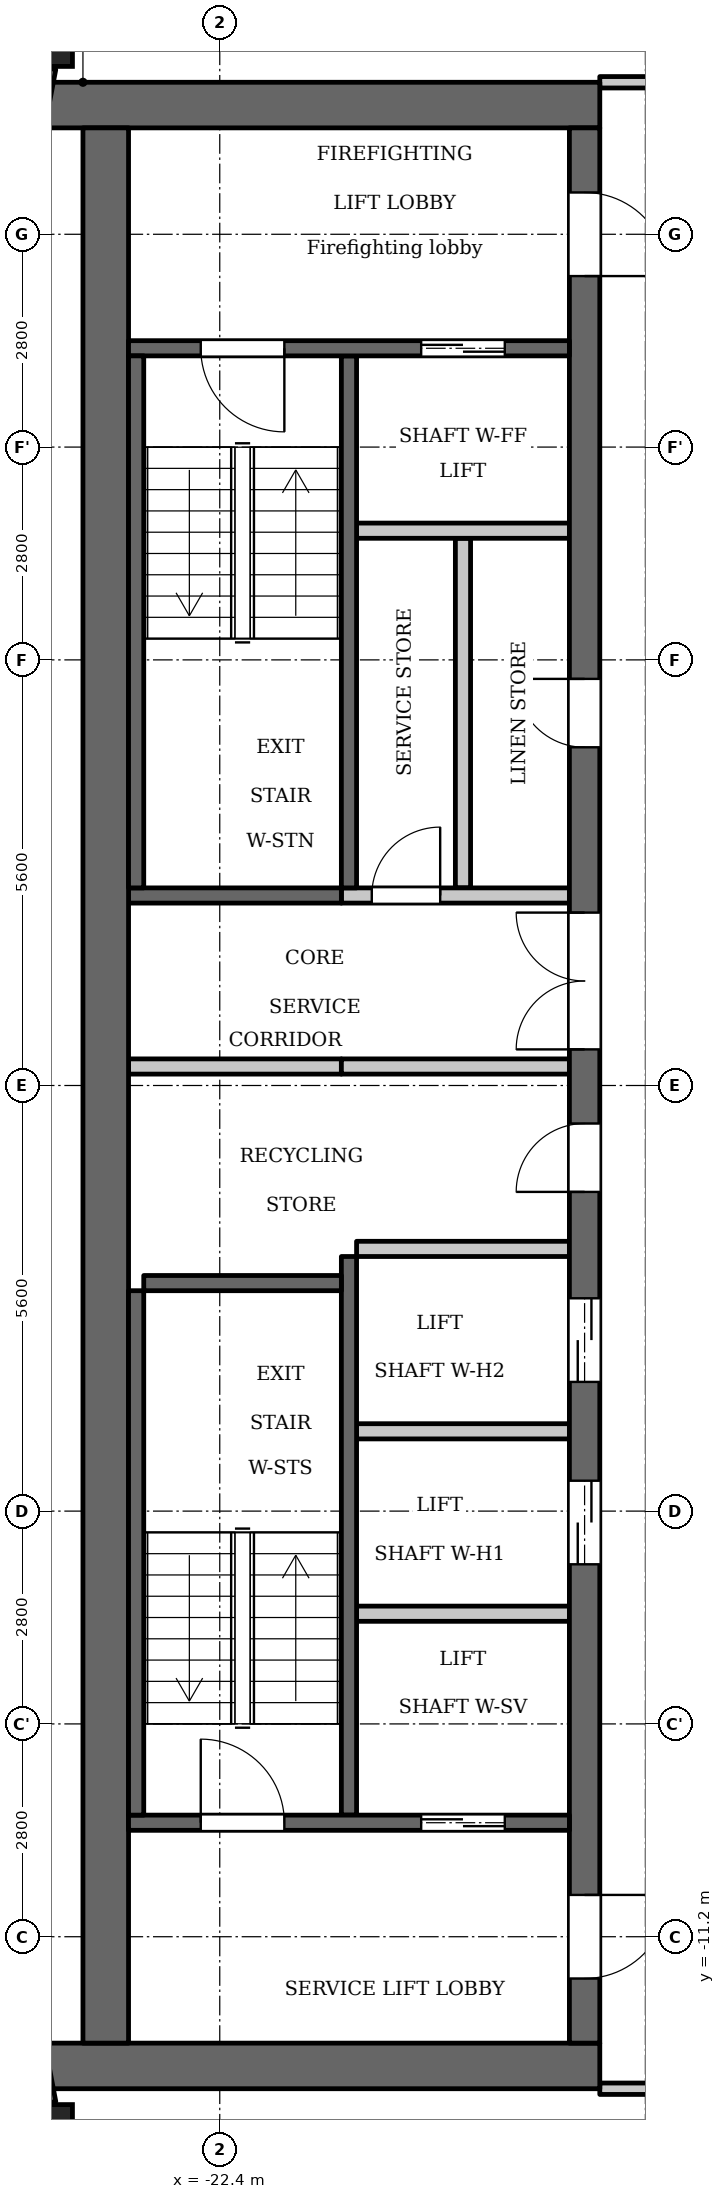
"""IFC4 building model, lengths in metres.
Left out: names, types, materials, properties, quantities, classifications, styles, units other than length and angle.
Written with IfcOpenShell. Run it as: python <this file> out.ifc"""

import sys

from ifc_helpers import new_model, si_unit, direction, frame, frame_2d, origin, origin_2d, place, context, subcontext, project, spatial, rectangle, extrude, element, fill, save


model = new_model("IFC4")
c1 = context("Model", 3, precision=1e-05, world=origin(), true_north=direction((0.0, 1.0)))
c2 = subcontext(c1, "Body", "Model", "MODEL_VIEW")
j1 = project(units=[si_unit("LENGTHUNIT", "METRE"), si_unit("PLANEANGLEUNIT", "RADIAN")], contexts=[c1])
p1 = place(None, origin())
s1 = spatial("IfcSite", under=j1, at=p1, CompositionType="ELEMENT")
p2 = place(p1, origin())
s2 = spatial("IfcBuilding", under=s1, at=p2, CompositionType="ELEMENT")
p3 = place(p2, frame((0.0, 0.0, 262.7)))
s3 = spatial("IfcBuildingStorey", under=s2, at=p3, CompositionType="ELEMENT", Elevation=262.7)
for number, where, z_axis, x_axis in (
    (1, (-24.738, 13.809, 0.0), (0.0, 0.0, 1.0), (1.0, 0.0, 0.0)),
    (2, (-24.738, -13.809, 0.0), (0.0, 0.0, 1.0), (1.0, 0.0, 0.0)),
):
    element("IfcColumn", number, at=place(p3, frame(where, z_axis=z_axis, x_axis=x_axis)), inside=s3, PredefinedType="COLUMN", context=c2, shape_type="SweptSolid", body=[
        extrude(rectangle(XDim=0.8, YDim=0.8, at=origin_2d()), origin(), (0.0, 0.0, 1.0), 3.5),
    ])
for number, where, z_axis, x_axis in (
    (3, (-24.705, 13.395, 0.0), (0.0, 0.0, 1.0), (-0.187, -0.982, 0.0)),
    (4, (-25.053, -11.572, 0.0), (0.0, 0.0, 1.0), (0.187, -0.982, 0.0)),
):
    element("IfcWall", number, at=place(p3, frame(where, z_axis=z_axis, x_axis=x_axis)), inside=s3, PredefinedType="SOLIDWALL", context=c2, shape_type="SweptSolid", body=[
        extrude(rectangle(XDim=1.856, YDim=0.3, at=frame_2d((0.928, 0.0))), origin(), (0.0, 0.0, 1.0), 2.55),
    ])
p4 = place(p3, frame((-20.7, 2.6, 0.0), z_axis=(0.0, 0.0, 1.0), x_axis=(0.0, 1.0, 0.0)))
e5 = element("IfcWall", 5, at=p4, inside=s3, PredefinedType="SHEAR", context=c2, shape_type="SweptSolid", body=[
    extrude(rectangle(XDim=7.0, YDim=0.2, at=frame_2d((3.5, 0.0))), origin(), (0.0, 0.0, 1.0), 3.2),
])
p5 = place(p3, frame((-20.7, -9.6, 0.0), z_axis=(0.0, 0.0, 1.0), x_axis=(0.0, 1.0, 0.0)))
e6 = element("IfcWall", 6, at=p5, inside=s3, PredefinedType="SHEAR", context=c2, shape_type="SweptSolid", body=[
    extrude(rectangle(XDim=7.35, YDim=0.2, at=frame_2d((3.675, 0.0))), origin(), (0.0, 0.0, 1.0), 3.2),
])
p6 = place(p3, frame((-20.8, 2.5, 0.0), z_axis=(0.0, 0.0, 1.0), x_axis=(-1.0, 0.0, 0.0)))
e7 = element("IfcWall", 7, at=p6, inside=s3, PredefinedType="SHEAR", context=c2, shape_type="SweptSolid", body=[
    extrude(rectangle(XDim=2.8, YDim=0.2, at=frame_2d((1.4, 0.0))), origin(), (0.0, 0.0, 1.0), 3.2),
])
p7 = place(p3, frame((-20.8, 0.25, 0.0), z_axis=(0.0, 0.0, 1.0), x_axis=(-1.0, 0.0, 0.0)))
e8 = element("IfcWall", 8, at=p7, inside=s3, PredefinedType="PARTITIONING", context=c2, shape_type="SweptSolid", body=[
    extrude(rectangle(XDim=2.8, YDim=0.2, at=frame_2d((1.4, 0.0))), origin(), (0.0, 0.0, 1.0), 3.2),
])
for number, where, z_axis, x_axis in (
    (9, (-17.4, 12.9, 0.0), (0.0, 0.0, 1.0), (-1.0, 0.0, 0.0)),
    (10, (-17.4, -12.9, 0.0), (0.0, 0.0, 1.0), (-1.0, 0.0, 0.0)),
):
    element("IfcWall", number, at=place(p3, frame(where, z_axis=z_axis, x_axis=x_axis)), inside=s3, PredefinedType="SHEAR", context=c2, shape_type="SweptSolid", body=[
        extrude(rectangle(XDim=7.32, YDim=0.6, at=frame_2d((3.66, 0.0))), origin(), (0.0, 0.0, 1.0), 3.2),
    ])
p8 = place(p3, frame((-19.2, 2.6, 0.0), z_axis=(0.0, 0.0, 1.0), x_axis=(0.0, 1.0, 0.0)))
e11 = element("IfcWall", 11, at=p8, inside=s3, PredefinedType="PARTITIONING", context=c2, shape_type="SweptSolid", body=[
    extrude(rectangle(XDim=4.6, YDim=0.2, at=frame_2d((2.3, 0.0))), origin(), (0.0, 0.0, 1.0), 3.2),
])
p9 = place(p3, frame((-17.6, -12.6, 0.0), z_axis=(0.0, 0.0, 1.0), x_axis=(0.0, 1.0, 0.0)))
e12 = element("IfcWall", 12, at=p9, inside=s3, PredefinedType="SHEAR", context=c2, shape_type="SweptSolid", body=[
    extrude(rectangle(XDim=25.2, YDim=0.4, at=frame_2d((12.6, 0.0))), origin(), (0.0, 0.0, 1.0), 3.2),
])
p10 = place(p9, frame((6.3, 0.0, 0.0)))
e13 = element("IfcOpeningElement", 13, at=p10, cuts=e12, PredefinedType="OPENING", context=c2, shape_type="SweptSolid", body=[
    extrude(rectangle(XDim=1.1, YDim=2.1, at=frame_2d((0.55, 1.05))), frame((0.0, 0.21, 0.0), z_axis=(0.0, -1.0, 0.0), x_axis=(1.0, 0.0, 0.0)), (0.0, 0.0, 1.0), 0.42),
])
p11 = place(p9, frame((8.7, 0.0, 0.0)))
e14 = element("IfcOpeningElement", 14, at=p11, cuts=e12, PredefinedType="OPENING", context=c2, shape_type="SweptSolid", body=[
    extrude(rectangle(XDim=1.1, YDim=2.1, at=frame_2d((0.55, 1.05))), frame((0.0, 0.21, 0.0), z_axis=(0.0, -1.0, 0.0), x_axis=(1.0, 0.0, 0.0)), (0.0, 0.0, 1.0), 0.42),
])
p12 = place(p9, frame((11.2, 0.0, 0.0)))
e15 = element("IfcOpeningElement", 15, at=p12, cuts=e12, PredefinedType="OPENING", context=c2, shape_type="SweptSolid", body=[
    extrude(rectangle(XDim=0.9, YDim=2.1, at=frame_2d((0.45, 1.05))), frame((0.0, 0.21, 0.0), z_axis=(0.0, -1.0, 0.0), x_axis=(1.0, 0.0, 0.0)), (0.0, 0.0, 1.0), 0.42),
])
p13 = place(p9, frame((17.05, 0.0, 0.0)))
e16 = element("IfcOpeningElement", 16, at=p13, cuts=e12, PredefinedType="OPENING", context=c2, shape_type="SweptSolid", body=[
    extrude(rectangle(XDim=0.9, YDim=2.1, at=frame_2d((0.45, 1.05))), frame((0.0, 0.21, 0.0), z_axis=(0.0, -1.0, 0.0), x_axis=(1.0, 0.0, 0.0)), (0.0, 0.0, 1.0), 0.42),
])
p14 = place(p9, frame((23.25, 0.0, 0.0)))
e17 = element("IfcOpeningElement", 17, at=p14, cuts=e12, PredefinedType="OPENING", context=c2, shape_type="SweptSolid", body=[
    extrude(rectangle(XDim=1.1, YDim=2.1, at=frame_2d((0.55, 1.05))), frame((0.0, 0.21, 0.0), z_axis=(0.0, -1.0, 0.0), x_axis=(1.0, 0.0, 0.0)), (0.0, 0.0, 1.0), 0.42),
])
p15 = place(p9, frame((0.85, 0.0, 0.0)))
e18 = element("IfcOpeningElement", 18, at=p15, cuts=e12, PredefinedType="OPENING", context=c2, shape_type="SweptSolid", body=[
    extrude(rectangle(XDim=1.1, YDim=2.1, at=frame_2d((0.55, 1.05))), frame((0.0, 0.21, 0.0), z_axis=(0.0, -1.0, 0.0), x_axis=(1.0, 0.0, 0.0)), (0.0, 0.0, 1.0), 0.42),
])
p16 = place(p9, frame((13.075, 0.0, 0.0)))
e19 = element("IfcOpeningElement", 19, at=p16, cuts=e12, PredefinedType="OPENING", context=c2, shape_type="SweptSolid", body=[
    extrude(rectangle(XDim=1.8, YDim=2.1, at=frame_2d((0.9, 1.05))), frame((0.0, 0.21, 0.0), z_axis=(0.0, -1.0, 0.0), x_axis=(1.0, 0.0, 0.0)), (0.0, 0.0, 1.0), 0.42),
])
p17 = place(p3, frame((-23.9, -12.6, 0.0), z_axis=(0.0, 0.0, 1.0), x_axis=(0.0, 1.0, 0.0)))
e20 = element("IfcWall", 20, at=p17, inside=s3, PredefinedType="SHEAR", context=c2, shape_type="SweptSolid", body=[
    extrude(rectangle(XDim=25.2, YDim=0.6, at=frame_2d((12.6, 0.0))), origin(), (0.0, 0.0, 1.0), 3.2),
])
p18 = place(p3, frame((-17.8, -9.7, 0.0), z_axis=(0.0, 0.0, 1.0), x_axis=(-1.0, 0.0, 0.0)))
e21 = element("IfcWall", 21, at=p18, inside=s3, PredefinedType="SHEAR", context=c2, shape_type="SweptSolid", body=[
    extrude(rectangle(XDim=5.8, YDim=0.2, at=frame_2d((2.9, 0.0))), origin(), (0.0, 0.0, 1.0), 3.2),
])
p19 = place(p18, frame((0.85, 0.0, 0.0)))
e22 = element("IfcOpeningElement", 22, at=p19, cuts=e21, PredefinedType="OPENING", context=c2, shape_type="SweptSolid", body=[
    extrude(rectangle(XDim=1.1, YDim=2.1, at=frame_2d((0.55, 1.05))), frame((0.0, 0.11, 0.0), z_axis=(0.0, -1.0, 0.0), x_axis=(1.0, 0.0, 0.0)), (0.0, 0.0, 1.0), 0.22),
])
p20 = place(p18, frame((3.75, 0.0, 0.0)))
e23 = element("IfcOpeningElement", 23, at=p20, cuts=e21, PredefinedType="OPENING", context=c2, shape_type="SweptSolid", body=[
    extrude(rectangle(XDim=1.1, YDim=2.1, at=frame_2d((0.55, 1.05))), frame((0.0, 0.11, 0.0), z_axis=(0.0, -1.0, 0.0), x_axis=(1.0, 0.0, 0.0)), (0.0, 0.0, 1.0), 0.22),
])
for number, where, z_axis, x_axis in (
    (24, (-17.8, -6.95, 0.0), (0.0, 0.0, 1.0), (-1.0, 0.0, 0.0)),
    (25, (-17.8, -4.55, 0.0), (0.0, 0.0, 1.0), (-1.0, 0.0, 0.0)),
    (26, (-17.8, -2.15, 0.0), (0.0, 0.0, 1.0), (-1.0, 0.0, 0.0)),
):
    element("IfcWall", number, at=place(p3, frame(where, z_axis=z_axis, x_axis=x_axis)), inside=s3, PredefinedType="PARTITIONING", context=c2, shape_type="SweptSolid", body=[
        extrude(rectangle(XDim=2.8, YDim=0.2, at=frame_2d((1.4, 0.0))), origin(), (0.0, 0.0, 1.0), 3.2),
    ])
p21 = place(p3, frame((-17.8, 0.25, 0.0), z_axis=(0.0, 0.0, 1.0), x_axis=(-1.0, 0.0, 0.0)))
e27 = element("IfcWall", 27, at=p21, inside=s3, PredefinedType="PARTITIONING", context=c2, shape_type="SweptSolid", body=[
    extrude(rectangle(XDim=3.0, YDim=0.2, at=frame_2d((1.5, 0.0))), origin(), (0.0, 0.0, 1.0), 3.2),
])
p22 = place(p3, frame((-17.8, 2.5, 0.0), z_axis=(0.0, 0.0, 1.0), x_axis=(-1.0, 0.0, 0.0)))
e28 = element("IfcWall", 28, at=p22, inside=s3, PredefinedType="PARTITIONING", context=c2, shape_type="SweptSolid", body=[
    extrude(rectangle(XDim=3.0, YDim=0.2, at=frame_2d((1.5, 0.0))), origin(), (0.0, 0.0, 1.0), 3.2),
])
p23 = place(p22, frame((1.7, 0.0, 0.0)))
e29 = element("IfcOpeningElement", 29, at=p23, cuts=e28, PredefinedType="OPENING", context=c2, shape_type="SweptSolid", body=[
    extrude(rectangle(XDim=0.9, YDim=2.1, at=frame_2d((0.45, 1.05))), frame((0.0, 0.11, 0.0), z_axis=(0.0, -1.0, 0.0), x_axis=(1.0, 0.0, 0.0)), (0.0, 0.0, 1.0), 0.22),
])
p24 = place(p3, frame((-17.8, 7.3, 0.0), z_axis=(0.0, 0.0, 1.0), x_axis=(-1.0, 0.0, 0.0)))
e30 = element("IfcWall", 30, at=p24, inside=s3, PredefinedType="PARTITIONING", context=c2, shape_type="SweptSolid", body=[
    extrude(rectangle(XDim=2.8, YDim=0.2, at=frame_2d((1.4, 0.0))), origin(), (0.0, 0.0, 1.0), 3.2),
])
p25 = place(p3, frame((-17.8, 9.7, 0.0), z_axis=(0.0, 0.0, 1.0), x_axis=(-1.0, 0.0, 0.0)))
e31 = element("IfcWall", 31, at=p25, inside=s3, PredefinedType="SHEAR", context=c2, shape_type="SweptSolid", body=[
    extrude(rectangle(XDim=5.8, YDim=0.2, at=frame_2d((2.9, 0.0))), origin(), (0.0, 0.0, 1.0), 3.2),
])
p26 = place(p25, frame((0.85, 0.0, 0.0)))
e32 = element("IfcOpeningElement", 32, at=p26, cuts=e31, PredefinedType="OPENING", context=c2, shape_type="SweptSolid", body=[
    extrude(rectangle(XDim=1.1, YDim=2.1, at=frame_2d((0.55, 1.05))), frame((0.0, 0.11, 0.0), z_axis=(0.0, -1.0, 0.0), x_axis=(1.0, 0.0, 0.0)), (0.0, 0.0, 1.0), 0.22),
])
p27 = place(p25, frame((3.75, 0.0, 0.0)))
e33 = element("IfcOpeningElement", 33, at=p27, cuts=e31, PredefinedType="OPENING", context=c2, shape_type="SweptSolid", body=[
    extrude(rectangle(XDim=1.1, YDim=2.1, at=frame_2d((0.55, 1.05))), frame((0.0, 0.11, 0.0), z_axis=(0.0, -1.0, 0.0), x_axis=(1.0, 0.0, 0.0)), (0.0, 0.0, 1.0), 0.22),
])
p28 = place(p3, frame((-23.5, 2.6, 0.0), z_axis=(0.0, 0.0, 1.0), x_axis=(0.0, 1.0, 0.0)))
e34 = element("IfcWall", 34, at=p28, inside=s3, PredefinedType="SHEAR", context=c2, shape_type="SweptSolid", body=[
    extrude(rectangle(XDim=7.0, YDim=0.2, at=frame_2d((3.5, 0.0))), origin(), (0.0, 0.0, 1.0), 3.2),
])
p29 = place(p3, frame((-23.5, -9.6, 0.0), z_axis=(0.0, 0.0, 1.0), x_axis=(0.0, 1.0, 0.0)))
e35 = element("IfcWall", 35, at=p29, inside=s3, PredefinedType="SHEAR", context=c2, shape_type="SweptSolid", body=[
    extrude(rectangle(XDim=6.9, YDim=0.2, at=frame_2d((3.45, 0.0))), origin(), (0.0, 0.0, 1.0), 3.2),
])
p30 = place(p3, frame((-20.8, -2.6, 0.0), z_axis=(0.0, 0.0, 1.0), x_axis=(-1.0, 0.0, 0.0)))
e36 = element("IfcWall", 36, at=p30, inside=s3, PredefinedType="SHEAR", context=c2, shape_type="SweptSolid", body=[
    extrude(rectangle(XDim=2.6, YDim=0.2, at=frame_2d((1.3, 0.0))), origin(), (0.0, 0.0, 1.0), 3.2),
])
p31 = place(p3, frame((-17.4, -13.2, 0.0), z_axis=(0.0, 0.0, 1.0), x_axis=(1.0, 0.0, 0.0)))
e37 = element("IfcWall", 37, at=p31, inside=s3, PredefinedType="PARTITIONING", context=c2, shape_type="SweptSolid", body=[
    extrude(rectangle(XDim=2.325, YDim=0.15, at=frame_2d((1.163, 0.0))), origin(), (0.0, 0.0, 1.0), 3.2),
])
p32 = place(p31, frame((0.65, 0.0, 0.0)))
e38 = element("IfcOpeningElement", 38, at=p32, cuts=e37, PredefinedType="OPENING", context=c2, shape_type="SweptSolid", body=[
    extrude(rectangle(XDim=1.0, YDim=2.1, at=frame_2d((0.5, 1.05))), frame((0.0, 0.085, 0.0), z_axis=(0.0, -1.0, 0.0), x_axis=(1.0, 0.0, 0.0)), (0.0, 0.0, 1.0), 0.17),
])
p33 = place(p3, frame((-17.4, 13.2, 0.0), z_axis=(0.0, 0.0, 1.0), x_axis=(1.0, 0.0, 0.0)))
e39 = element("IfcWall", 39, at=p33, inside=s3, PredefinedType="PARTITIONING", context=c2, shape_type="SweptSolid", body=[
    extrude(rectangle(XDim=2.325, YDim=0.15, at=frame_2d((1.163, 0.0))), origin(), (0.0, 0.0, 1.0), 3.2),
])
p34 = place(p33, frame((0.75, 0.0, 0.0)))
e40 = element("IfcOpeningElement", 40, at=p34, cuts=e39, PredefinedType="OPENING", context=c2, shape_type="SweptSolid", body=[
    extrude(rectangle(XDim=1.0, YDim=2.1, at=frame_2d((0.5, 1.05))), frame((0.0, 0.085, 0.0), z_axis=(0.0, -1.0, 0.0), x_axis=(1.0, 0.0, 0.0)), (0.0, 0.0, 1.0), 0.17),
])
p35 = place(p19, origin())
e41 = element("IfcDoor", 41, at=p35, inside=s3, OperationType="DOUBLE_DOOR_SLIDING", PredefinedType="DOOR", context=c2, shape_type="SweptSolid", body=[
    extrude(rectangle(XDim=1.1, YDim=2.1, at=frame_2d((0.55, 1.05))), frame((0.0, 0.025, 0.0), z_axis=(0.0, -1.0, 0.0), x_axis=(1.0, 0.0, 0.0)), (0.0, 0.0, 1.0), 0.05),
])
fill(e22, e41)
p36 = place(p10, origin())
e42 = element("IfcDoor", 42, at=p36, inside=s3, OperationType="DOUBLE_DOOR_SLIDING", PredefinedType="DOOR", context=c2, shape_type="SweptSolid", body=[
    extrude(rectangle(XDim=1.1, YDim=2.1, at=frame_2d((0.55, 1.05))), frame((0.0, 0.025, 0.0), z_axis=(0.0, -1.0, 0.0), x_axis=(1.0, 0.0, 0.0)), (0.0, 0.0, 1.0), 0.05),
])
fill(e13, e42)
p37 = place(p11, origin())
e43 = element("IfcDoor", 43, at=p37, inside=s3, OperationType="DOUBLE_DOOR_SLIDING", PredefinedType="DOOR", context=c2, shape_type="SweptSolid", body=[
    extrude(rectangle(XDim=1.1, YDim=2.1, at=frame_2d((0.55, 1.05))), frame((0.0, 0.025, 0.0), z_axis=(0.0, -1.0, 0.0), x_axis=(1.0, 0.0, 0.0)), (0.0, 0.0, 1.0), 0.05),
])
fill(e14, e43)
p38 = place(p12, origin())
e44 = element("IfcDoor", 44, at=p38, inside=s3, OperationType="SINGLE_SWING_RIGHT", PredefinedType="DOOR", context=c2, shape_type="SweptSolid", body=[
    extrude(rectangle(XDim=0.9, YDim=2.1, at=frame_2d((0.45, 1.05))), frame((0.0, 0.025, 0.0), z_axis=(0.0, -1.0, 0.0), x_axis=(1.0, 0.0, 0.0)), (0.0, 0.0, 1.0), 0.05),
])
fill(e15, e44)
p39 = place(p13, origin())
e45 = element("IfcDoor", 45, at=p39, inside=s3, OperationType="SINGLE_SWING_LEFT", PredefinedType="DOOR", context=c2, shape_type="SweptSolid", body=[
    extrude(rectangle(XDim=0.9, YDim=2.1, at=frame_2d((0.45, 1.05))), frame((0.0, 0.025, 0.0), z_axis=(0.0, -1.0, 0.0), x_axis=(1.0, 0.0, 0.0)), (0.0, 0.0, 1.0), 0.05),
])
fill(e16, e45)
p40 = place(p23, origin())
e46 = element("IfcDoor", 46, at=p40, inside=s3, OperationType="SINGLE_SWING_LEFT", PredefinedType="DOOR", context=c2, shape_type="SweptSolid", body=[
    extrude(rectangle(XDim=0.9, YDim=2.1, at=frame_2d((0.45, 1.05))), frame((0.0, 0.025, 0.0), z_axis=(0.0, -1.0, 0.0), x_axis=(1.0, 0.0, 0.0)), (0.0, 0.0, 1.0), 0.05),
])
fill(e29, e46)
p41 = place(p26, origin())
e47 = element("IfcDoor", 47, at=p41, inside=s3, OperationType="DOUBLE_DOOR_SLIDING", PredefinedType="DOOR", context=c2, shape_type="SweptSolid", body=[
    extrude(rectangle(XDim=1.1, YDim=2.1, at=frame_2d((0.55, 1.05))), frame((0.0, 0.025, 0.0), z_axis=(0.0, -1.0, 0.0), x_axis=(1.0, 0.0, 0.0)), (0.0, 0.0, 1.0), 0.05),
])
fill(e32, e47)
p42 = place(p14, origin())
e48 = element("IfcDoor", 48, at=p42, inside=s3, OperationType="SINGLE_SWING_LEFT", PredefinedType="DOOR", context=c2, shape_type="SweptSolid", body=[
    extrude(rectangle(XDim=1.1, YDim=2.1, at=frame_2d((0.55, 1.05))), frame((0.0, 0.025, 0.0), z_axis=(0.0, -1.0, 0.0), x_axis=(1.0, 0.0, 0.0)), (0.0, 0.0, 1.0), 0.05),
])
fill(e17, e48)
p43 = place(p15, origin())
e49 = element("IfcDoor", 49, at=p43, inside=s3, OperationType="SINGLE_SWING_RIGHT", PredefinedType="DOOR", context=c2, shape_type="SweptSolid", body=[
    extrude(rectangle(XDim=1.1, YDim=2.1, at=frame_2d((0.55, 1.05))), frame((0.0, 0.025, 0.0), z_axis=(0.0, -1.0, 0.0), x_axis=(1.0, 0.0, 0.0)), (0.0, 0.0, 1.0), 0.05),
])
fill(e18, e49)
p44 = place(p27, origin())
e50 = element("IfcDoor", 50, at=p44, inside=s3, OperationType="SINGLE_SWING_RIGHT", PredefinedType="DOOR", context=c2, shape_type="SweptSolid", body=[
    extrude(rectangle(XDim=1.1, YDim=2.1, at=frame_2d((0.55, 1.05))), frame((0.0, 0.025, 0.0), z_axis=(0.0, -1.0, 0.0), x_axis=(1.0, 0.0, 0.0)), (0.0, 0.0, 1.0), 0.05),
])
fill(e33, e50)
p45 = place(p20, origin())
e51 = element("IfcDoor", 51, at=p45, inside=s3, OperationType="SINGLE_SWING_RIGHT", PredefinedType="DOOR", context=c2, shape_type="SweptSolid", body=[
    extrude(rectangle(XDim=1.1, YDim=2.1, at=frame_2d((0.55, 1.05))), frame((0.0, 0.025, 0.0), z_axis=(0.0, -1.0, 0.0), x_axis=(1.0, 0.0, 0.0)), (0.0, 0.0, 1.0), 0.05),
])
fill(e23, e51)
p46 = place(p16, origin())
e52 = element("IfcDoor", 52, at=p46, inside=s3, OperationType="DOUBLE_DOOR_SINGLE_SWING", PredefinedType="DOOR", context=c2, shape_type="SweptSolid", body=[
    extrude(rectangle(XDim=1.8, YDim=2.1, at=frame_2d((0.9, 1.05))), frame((0.0, 0.025, 0.0), z_axis=(0.0, -1.0, 0.0), x_axis=(1.0, 0.0, 0.0)), (0.0, 0.0, 1.0), 0.05),
])
fill(e19, e52)
save(model, sys.argv[1])
